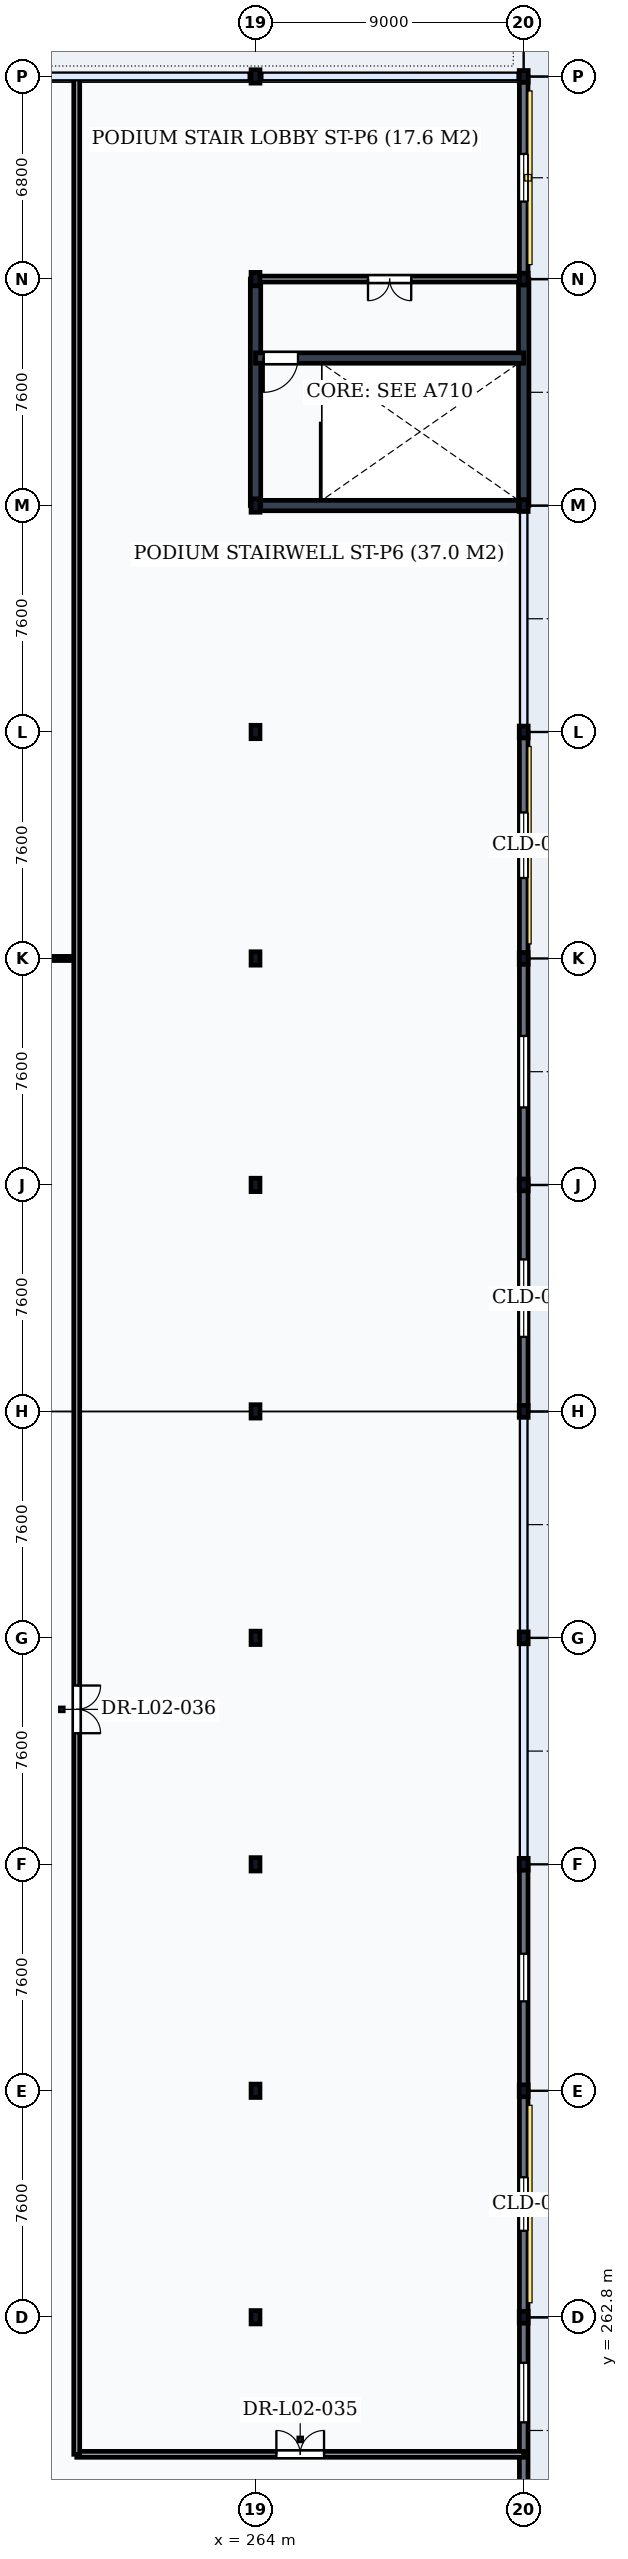
"""IFC4 building model, lengths in metres.
Left out: names, types, materials, properties, quantities, classifications, styles, units other than length and angle.
Written with IfcOpenShell. Run it as: python <this file> out.ifc"""

import sys

from ifc_helpers import new_model, si_unit, direction, frame, frame_2d, origin, origin_2d, place, context, subcontext, project, spatial, rectangle, i_section, extrude, element, fill, save


model = new_model("IFC4")
c1 = context("Model", 3, precision=1e-05, world=origin(), true_north=direction((0.0, 1.0)))
c2 = subcontext(c1, "Body", "Model", "MODEL_VIEW")
j1 = project(units=[si_unit("LENGTHUNIT", "METRE"), si_unit("PLANEANGLEUNIT", "RADIAN")], contexts=[c1])
p1 = place(None, origin())
s1 = spatial("IfcSite", under=j1, at=p1, CompositionType="ELEMENT")
p2 = place(p1, origin())
s2 = spatial("IfcBuilding", under=s1, at=p2, CompositionType="ELEMENT")
p3 = place(p2, frame((0.0, 0.0, 5.4)))
s3 = spatial("IfcBuildingStorey", under=s2, at=p3, CompositionType="ELEMENT", Elevation=5.4)
for number, where, z_axis, x_axis in (
    (1, (264.0, 262.8, 0.0), (0.0, 0.0, 1.0), (1.0, 0.0, 0.0)),
    (2, (264.0, 270.4, 0.0), (0.0, 0.0, 1.0), (1.0, 0.0, 0.0)),
    (3, (264.0, 278.0, 0.0), (0.0, 0.0, 1.0), (1.0, 0.0, 0.0)),
    (4, (264.0, 285.6, 0.0), (0.0, 0.0, 1.0), (1.0, 0.0, 0.0)),
    (5, (264.0, 293.2, 0.0), (0.0, 0.0, 1.0), (1.0, 0.0, 0.0)),
    (6, (264.0, 300.8, 0.0), (0.0, 0.0, 1.0), (1.0, 0.0, 0.0)),
    (7, (264.0, 308.4, 0.0), (0.0, 0.0, 1.0), (1.0, 0.0, 0.0)),
    (8, (264.0, 316.0, 0.0), (0.0, 0.0, 1.0), (1.0, 0.0, 0.0)),
    (9, (264.0, 323.6, 0.0), (0.0, 0.0, 1.0), (1.0, 0.0, 0.0)),
    (10, (264.0, 331.2, 0.0), (0.0, 0.0, 1.0), (1.0, 0.0, 0.0)),
    (11, (264.0, 338.0, 0.0), (0.0, 0.0, 1.0), (1.0, 0.0, 0.0)),
):
    element("IfcColumn", number, at=place(p3, frame(where, z_axis=z_axis, x_axis=x_axis)), inside=s3, PredefinedType="COLUMN", context=c2, shape_type="SweptSolid", body=[
        extrude(i_section(OverallWidth=0.3, OverallDepth=0.45, WebThickness=0.014, FlangeThickness=0.026, FilletRadius=0.027, at=origin_2d()), origin(), (0.0, 0.0, 1.0), 5.1),
    ])
for number, where, z_axis, x_axis in (
    (12, (273.0, 262.8, 0.0), (0.0, 0.0, 1.0), (1.0, 0.0, 0.0)),
    (13, (273.0, 270.4, 0.0), (0.0, 0.0, 1.0), (1.0, 0.0, 0.0)),
    (14, (273.0, 278.0, 0.0), (0.0, 0.0, 1.0), (1.0, 0.0, 0.0)),
    (15, (273.0, 285.6, 0.0), (0.0, 0.0, 1.0), (1.0, 0.0, 0.0)),
    (16, (273.0, 293.2, 0.0), (0.0, 0.0, 1.0), (1.0, 0.0, 0.0)),
    (17, (273.0, 300.8, 0.0), (0.0, 0.0, 1.0), (1.0, 0.0, 0.0)),
    (18, (273.0, 308.4, 0.0), (0.0, 0.0, 1.0), (1.0, 0.0, 0.0)),
    (19, (273.0, 316.0, 0.0), (0.0, 0.0, 1.0), (1.0, 0.0, 0.0)),
    (20, (273.0, 323.6, 0.0), (0.0, 0.0, 1.0), (1.0, 0.0, 0.0)),
    (21, (273.0, 331.2, 0.0), (0.0, 0.0, 1.0), (1.0, 0.0, 0.0)),
    (22, (273.0, 338.0, 0.0), (0.0, 0.0, 1.0), (1.0, 0.0, 0.0)),
):
    element("IfcColumn", number, at=place(p3, frame(where, z_axis=z_axis, x_axis=x_axis)), inside=s3, PredefinedType="COLUMN", context=c2, shape_type="SweptSolid", body=[
        extrude(i_section(OverallWidth=0.3, OverallDepth=0.4, WebThickness=0.013, FlangeThickness=0.024, FilletRadius=0.027, at=origin_2d()), origin(), (0.0, 0.0, 1.0), 5.1),
    ])
p4 = place(p3, frame((273.0, 255.206, 0.0), z_axis=(0.0, 0.0, 1.0), x_axis=(0.0, 1.0, 0.0)))
e23 = element("IfcWall", 23, at=p4, inside=s3, PredefinedType="SOLIDWALL", context=c2, shape_type="SweptSolid", body=[
    extrude(rectangle(XDim=7.588, YDim=0.29, at=frame_2d((3.794, 0.0))), origin(), (0.0, 0.0, 1.0), 4.588),
])
p5 = place(p4, frame((4.066, 0.0, 0.95)))
e24 = element("IfcOpeningElement", 24, at=p5, cuts=e23, PredefinedType="OPENING", context=c2, shape_type="SweptSolid", body=[
    extrude(rectangle(XDim=2.0, YDim=2.6, at=frame_2d((1.0, 1.3))), frame((0.0, 0.16, 0.0), z_axis=(0.0, -1.0, 0.0), x_axis=(1.0, 0.0, 0.0)), (0.0, 0.0, 1.0), 0.32),
])
p6 = place(p3, frame((273.0, 262.806, 0.0), z_axis=(0.0, 0.0, 1.0), x_axis=(0.0, 1.0, 0.0)))
e25 = element("IfcWall", 25, at=p6, inside=s3, PredefinedType="SOLIDWALL", context=c2, shape_type="SweptSolid", body=[
    extrude(rectangle(XDim=7.588, YDim=0.29, at=frame_2d((3.794, 0.0))), origin(), (0.0, 0.0, 1.0), 4.588),
])
p7 = place(p6, frame((2.894, 0.0, 0.95)))
e26 = element("IfcOpeningElement", 26, at=p7, cuts=e25, PredefinedType="OPENING", context=c2, shape_type="SweptSolid", body=[
    extrude(rectangle(XDim=1.8, YDim=2.6, at=frame_2d((0.9, 1.3))), frame((0.0, 0.16, 0.0), z_axis=(0.0, -1.0, 0.0), x_axis=(1.0, 0.0, 0.0)), (0.0, 0.0, 1.0), 0.32),
])
p8 = place(p3, frame((273.0, 270.406, 0.0), z_axis=(0.0, 0.0, 1.0), x_axis=(0.0, 1.0, 0.0)))
e27 = element("IfcWall", 27, at=p8, inside=s3, PredefinedType="SOLIDWALL", context=c2, shape_type="SweptSolid", body=[
    extrude(rectangle(XDim=7.588, YDim=0.29, at=frame_2d((3.794, 0.0))), origin(), (0.0, 0.0, 1.0), 4.588),
])
p9 = place(p8, frame((2.994, 0.0, 0.95)))
e28 = element("IfcOpeningElement", 28, at=p9, cuts=e27, PredefinedType="OPENING", context=c2, shape_type="SweptSolid", body=[
    extrude(rectangle(XDim=1.6, YDim=2.4, at=frame_2d((0.8, 1.2))), frame((0.0, 0.16, 0.0), z_axis=(0.0, -1.0, 0.0), x_axis=(1.0, 0.0, 0.0)), (0.0, 0.0, 1.0), 0.32),
])
p10 = place(p3, frame((273.0, 293.206, 0.0), z_axis=(0.0, 0.0, 1.0), x_axis=(0.0, 1.0, 0.0)))
e29 = element("IfcWall", 29, at=p10, inside=s3, PredefinedType="SOLIDWALL", context=c2, shape_type="SweptSolid", body=[
    extrude(rectangle(XDim=7.588, YDim=0.29, at=frame_2d((3.794, 0.0))), origin(), (0.0, 0.0, 1.0), 4.588),
])
p11 = place(p10, frame((2.494, 0.0, 0.95)))
e30 = element("IfcOpeningElement", 30, at=p11, cuts=e29, PredefinedType="OPENING", context=c2, shape_type="SweptSolid", body=[
    extrude(rectangle(XDim=2.6, YDim=3.0, at=frame_2d((1.3, 1.5))), frame((0.0, 0.16, 0.0), z_axis=(0.0, -1.0, 0.0), x_axis=(1.0, 0.0, 0.0)), (0.0, 0.0, 1.0), 0.32),
])
p12 = place(p3, frame((273.0, 300.806, 0.0), z_axis=(0.0, 0.0, 1.0), x_axis=(0.0, 1.0, 0.0)))
e31 = element("IfcWall", 31, at=p12, inside=s3, PredefinedType="SOLIDWALL", context=c2, shape_type="SweptSolid", body=[
    extrude(rectangle(XDim=7.588, YDim=0.29, at=frame_2d((3.794, 0.0))), origin(), (0.0, 0.0, 1.0), 4.588),
])
p13 = place(p12, frame((2.594, 0.0, 0.95)))
e32 = element("IfcOpeningElement", 32, at=p13, cuts=e31, PredefinedType="OPENING", context=c2, shape_type="SweptSolid", body=[
    extrude(rectangle(XDim=2.4, YDim=2.8, at=frame_2d((1.2, 1.4))), frame((0.0, 0.16, 0.0), z_axis=(0.0, -1.0, 0.0), x_axis=(1.0, 0.0, 0.0)), (0.0, 0.0, 1.0), 0.32),
])
p14 = place(p3, frame((273.0, 308.406, 0.0), z_axis=(0.0, 0.0, 1.0), x_axis=(0.0, 1.0, 0.0)))
e33 = element("IfcWall", 33, at=p14, inside=s3, PredefinedType="SOLIDWALL", context=c2, shape_type="SweptSolid", body=[
    extrude(rectangle(XDim=7.588, YDim=0.29, at=frame_2d((3.794, 0.0))), origin(), (0.0, 0.0, 1.0), 4.588),
])
p15 = place(p14, frame((2.694, 0.0, 0.95)))
e34 = element("IfcOpeningElement", 34, at=p15, cuts=e33, PredefinedType="OPENING", context=c2, shape_type="SweptSolid", body=[
    extrude(rectangle(XDim=2.2, YDim=2.8, at=frame_2d((1.1, 1.4))), frame((0.0, 0.16, 0.0), z_axis=(0.0, -1.0, 0.0), x_axis=(1.0, 0.0, 0.0)), (0.0, 0.0, 1.0), 0.32),
])
p16 = place(p3, frame((273.0, 331.206, 0.0), z_axis=(0.0, 0.0, 1.0), x_axis=(0.0, 1.0, 0.0)))
e35 = element("IfcWall", 35, at=p16, inside=s3, PredefinedType="SOLIDWALL", context=c2, shape_type="SweptSolid", body=[
    extrude(rectangle(XDim=6.788, YDim=0.29, at=frame_2d((3.394, 0.0))), origin(), (0.0, 0.0, 1.0), 4.618),
])
p17 = place(p16, frame((2.594, 0.0, 0.95)))
e36 = element("IfcOpeningElement", 36, at=p17, cuts=e35, PredefinedType="OPENING", context=c2, shape_type="SweptSolid", body=[
    extrude(rectangle(XDim=1.6, YDim=2.4, at=frame_2d((0.8, 1.2))), frame((0.0, 0.16, 0.0), z_axis=(0.0, -1.0, 0.0), x_axis=(1.0, 0.0, 0.0)), (0.0, 0.0, 1.0), 0.32),
])
p18 = place(p3, frame((255.1, 337.9, 5.1), z_axis=(0.0, 0.0, 1.0), x_axis=(1.0, 0.0, 0.0)))
e37 = element("IfcWall", 37, at=p18, inside=s3, PredefinedType="PARAPET", context=c2, shape_type="SweptSolid", body=[
    extrude(rectangle(XDim=17.8, YDim=0.18, at=frame_2d((8.9, 0.0))), origin(), (0.0, 0.0, 1.0), 1.2),
])
p19 = place(p3, frame((272.9, 323.8, 5.1), z_axis=(0.0, 0.0, 1.0), x_axis=(0.0, 1.0, 0.0)))
e38 = element("IfcWall", 38, at=p19, inside=s3, PredefinedType="PARAPET", context=c2, shape_type="SweptSolid", body=[
    extrude(rectangle(XDim=14.0, YDim=0.18, at=frame_2d((7.0, 0.0))), origin(), (0.0, 0.0, 1.0), 1.2),
])
p20 = place(p3, frame((264.0, 323.6, 0.0), z_axis=(0.0, 0.0, 1.0), x_axis=(1.0, 0.0, 0.0)))
e39 = element("IfcWall", 39, at=p20, inside=s3, PredefinedType="SHEAR", context=c2, shape_type="SweptSolid", body=[
    extrude(rectangle(XDim=9.0, YDim=0.35, at=frame_2d((4.5, 0.0))), origin(), (0.0, 0.0, 1.0), 4.85),
])
for number, where, z_axis, x_axis in (
    (40, (264.0, 323.6, 0.0), (0.0, 0.0, 1.0), (0.0, 1.0, 0.0)),
    (41, (273.0, 323.6, 0.0), (0.0, 0.0, 1.0), (0.0, 1.0, 0.0)),
):
    element("IfcWall", number, at=place(p3, frame(where, z_axis=z_axis, x_axis=x_axis)), inside=s3, PredefinedType="SHEAR", context=c2, shape_type="SweptSolid", body=[
        extrude(rectangle(XDim=7.6, YDim=0.35, at=frame_2d((3.8, 0.0))), origin(), (0.0, 0.0, 1.0), 4.85),
    ])
p21 = place(p3, frame((264.0, 328.55, 0.0), z_axis=(0.0, 0.0, 1.0), x_axis=(1.0, 0.0, 0.0)))
e42 = element("IfcWall", 42, at=p21, inside=s3, PredefinedType="SHEAR", context=c2, shape_type="SweptSolid", body=[
    extrude(rectangle(XDim=9.0, YDim=0.35, at=frame_2d((4.5, 0.0))), origin(), (0.0, 0.0, 1.0), 4.85),
])
p22 = place(p21, frame((0.275, 0.0, 0.0)))
e43 = element("IfcOpeningElement", 43, at=p22, cuts=e42, PredefinedType="OPENING", context=c2, shape_type="SweptSolid", body=[
    extrude(rectangle(XDim=1.15, YDim=2.15, at=frame_2d((0.575, 1.075))), frame((0.0, 0.19, 0.0), z_axis=(0.0, -1.0, 0.0), x_axis=(1.0, 0.0, 0.0)), (0.0, 0.0, 1.0), 0.38),
])
p23 = place(p3, frame((264.0, 331.2, 0.0), z_axis=(0.0, 0.0, 1.0), x_axis=(1.0, 0.0, 0.0)))
e44 = element("IfcWall", 44, at=p23, inside=s3, PredefinedType="PARTITIONING", context=c2, shape_type="SweptSolid", body=[
    extrude(rectangle(XDim=9.0, YDim=0.2, at=frame_2d((4.5, 0.0))), origin(), (0.0, 0.0, 1.0), 4.298),
])
p24 = place(p23, frame((3.775, 0.0, 0.0)))
e45 = element("IfcOpeningElement", 45, at=p24, cuts=e44, PredefinedType="OPENING", context=c2, shape_type="SweptSolid", body=[
    extrude(rectangle(XDim=1.45, YDim=2.2, at=frame_2d((0.725, 1.1))), frame((0.0, 0.115, 0.0), z_axis=(0.0, -1.0, 0.0), x_axis=(1.0, 0.0, 0.0)), (0.0, 0.0, 1.0), 0.23),
])
p25 = place(p3, frame((255.0, 308.4, 0.0), z_axis=(0.0, 0.0, 1.0), x_axis=(1.0, 0.0, 0.0)))
e46 = element("IfcWall", 46, at=p25, inside=s3, PredefinedType="PARTITIONING", context=c2, shape_type="SweptSolid", body=[
    extrude(rectangle(XDim=3.0, YDim=0.14, at=frame_2d((1.5, 0.0))), origin(), (0.0, 0.0, 1.0), 4.308),
])
p26 = place(p25, frame((0.95, 0.0, 0.0)))
e47 = element("IfcOpeningElement", 47, at=p26, cuts=e46, PredefinedType="OPENING", context=c2, shape_type="SweptSolid", body=[
    extrude(rectangle(XDim=1.1, YDim=2.1, at=frame_2d((0.55, 1.05))), frame((0.0, 0.085, 0.0), z_axis=(0.0, -1.0, 0.0), x_axis=(1.0, 0.0, 0.0)), (0.0, 0.0, 1.0), 0.17),
])
p27 = place(p3, frame((258.0, 258.2, 0.0), z_axis=(0.0, 0.0, 1.0), x_axis=(1.0, 0.0, 0.0)))
e48 = element("IfcWall", 48, at=p27, inside=s3, PredefinedType="PARTITIONING", context=c2, shape_type="SweptSolid", body=[
    extrude(rectangle(XDim=15.0, YDim=0.2, at=frame_2d((7.5, 0.0))), origin(), (0.0, 0.0, 1.0), 4.86),
])
p28 = place(p27, frame((6.7, 0.0, 0.0)))
e49 = element("IfcOpeningElement", 49, at=p28, cuts=e48, PredefinedType="OPENING", context=c2, shape_type="SweptSolid", body=[
    extrude(rectangle(XDim=1.6, YDim=2.25, at=frame_2d((0.8, 1.125))), frame((0.0, 0.115, 0.0), z_axis=(0.0, -1.0, 0.0), x_axis=(1.0, 0.0, 0.0)), (0.0, 0.0, 1.0), 0.23),
])
p29 = place(p3, frame((258.0, 258.2, 0.0), z_axis=(0.0, 0.0, 1.0), x_axis=(0.0, 1.0, 0.0)))
e50 = element("IfcWall", 50, at=p29, inside=s3, PredefinedType="PARTITIONING", context=c2, shape_type="SweptSolid", body=[
    extrude(rectangle(XDim=79.8, YDim=0.2, at=frame_2d((39.9, 0.0))), origin(), (0.0, 0.0, 1.0), 4.85),
])
p30 = place(p29, frame((24.2, 0.0, 0.0)))
e51 = element("IfcOpeningElement", 51, at=p30, cuts=e50, PredefinedType="OPENING", context=c2, shape_type="SweptSolid", body=[
    extrude(rectangle(XDim=1.6, YDim=2.25, at=frame_2d((0.8, 1.125))), frame((0.0, 0.115, 0.0), z_axis=(0.0, -1.0, 0.0), x_axis=(1.0, 0.0, 0.0)), (0.0, 0.0, 1.0), 0.23),
])
p31 = place(p5, origin())
e52 = element("IfcWindow", 52, at=p31, inside=s3, PartitioningType="DOUBLE_PANEL_VERTICAL", PredefinedType="WINDOW", context=c2, shape_type="SweptSolid", body=[
    extrude(rectangle(XDim=2.0, YDim=2.6, at=frame_2d((1.0, 1.3))), frame((0.0, 0.03, 0.0), z_axis=(0.0, -1.0, 0.0), x_axis=(1.0, 0.0, 0.0)), (0.0, 0.0, 1.0), 0.06),
])
fill(e24, e52)
p32 = place(p7, origin())
e53 = element("IfcWindow", 53, at=p32, inside=s3, PartitioningType="DOUBLE_PANEL_VERTICAL", PredefinedType="WINDOW", context=c2, shape_type="SweptSolid", body=[
    extrude(rectangle(XDim=1.8, YDim=2.6, at=frame_2d((0.9, 1.3))), frame((0.0, 0.03, 0.0), z_axis=(0.0, -1.0, 0.0), x_axis=(1.0, 0.0, 0.0)), (0.0, 0.0, 1.0), 0.06),
])
fill(e26, e53)
p33 = place(p9, origin())
e54 = element("IfcWindow", 54, at=p33, inside=s3, PartitioningType="SINGLE_PANEL", PredefinedType="WINDOW", context=c2, shape_type="SweptSolid", body=[
    extrude(rectangle(XDim=1.6, YDim=2.4, at=frame_2d((0.8, 1.2))), frame((0.0, 0.03, 0.0), z_axis=(0.0, -1.0, 0.0), x_axis=(1.0, 0.0, 0.0)), (0.0, 0.0, 1.0), 0.06),
])
fill(e28, e54)
p34 = place(p11, origin())
e55 = element("IfcWindow", 55, at=p34, inside=s3, PartitioningType="DOUBLE_PANEL_VERTICAL", PredefinedType="WINDOW", context=c2, shape_type="SweptSolid", body=[
    extrude(rectangle(XDim=2.6, YDim=3.0, at=frame_2d((1.3, 1.5))), frame((0.0, 0.03, 0.0), z_axis=(0.0, -1.0, 0.0), x_axis=(1.0, 0.0, 0.0)), (0.0, 0.0, 1.0), 0.06),
])
fill(e30, e55)
p35 = place(p13, origin())
e56 = element("IfcWindow", 56, at=p35, inside=s3, PartitioningType="DOUBLE_PANEL_VERTICAL", PredefinedType="WINDOW", context=c2, shape_type="SweptSolid", body=[
    extrude(rectangle(XDim=2.4, YDim=2.8, at=frame_2d((1.2, 1.4))), frame((0.0, 0.03, 0.0), z_axis=(0.0, -1.0, 0.0), x_axis=(1.0, 0.0, 0.0)), (0.0, 0.0, 1.0), 0.06),
])
fill(e32, e56)
p36 = place(p15, origin())
e57 = element("IfcWindow", 57, at=p36, inside=s3, PartitioningType="DOUBLE_PANEL_VERTICAL", PredefinedType="WINDOW", context=c2, shape_type="SweptSolid", body=[
    extrude(rectangle(XDim=2.2, YDim=2.8, at=frame_2d((1.1, 1.4))), frame((0.0, 0.03, 0.0), z_axis=(0.0, -1.0, 0.0), x_axis=(1.0, 0.0, 0.0)), (0.0, 0.0, 1.0), 0.06),
])
fill(e34, e57)
p37 = place(p17, origin())
e58 = element("IfcWindow", 58, at=p37, inside=s3, PartitioningType="SINGLE_PANEL", PredefinedType="WINDOW", context=c2, shape_type="SweptSolid", body=[
    extrude(rectangle(XDim=1.6, YDim=2.4, at=frame_2d((0.8, 1.2))), frame((0.0, 0.03, 0.0), z_axis=(0.0, -1.0, 0.0), x_axis=(1.0, 0.0, 0.0)), (0.0, 0.0, 1.0), 0.06),
])
fill(e36, e58)
p38 = place(p22, frame((1.15, 0.0, 0.0), z_axis=(0.0, 0.0, 1.0), x_axis=(-1.0, 0.0, 0.0)))
e59 = element("IfcDoor", 59, at=p38, inside=s3, OperationType="SINGLE_SWING_RIGHT", PredefinedType="DOOR", context=c2, shape_type="SweptSolid", body=[
    extrude(rectangle(XDim=1.15, YDim=2.15, at=frame_2d((0.575, 1.075))), frame((0.0, 0.025, 0.0), z_axis=(0.0, -1.0, 0.0), x_axis=(1.0, 0.0, 0.0)), (0.0, 0.0, 1.0), 0.05),
])
fill(e43, e59)
p39 = place(p24, frame((1.45, 0.0, 0.0), z_axis=(0.0, 0.0, 1.0), x_axis=(-1.0, 0.0, 0.0)))
e60 = element("IfcDoor", 60, at=p39, inside=s3, OperationType="DOUBLE_DOOR_SINGLE_SWING", PredefinedType="DOOR", context=c2, shape_type="SweptSolid", body=[
    extrude(rectangle(XDim=1.45, YDim=2.2, at=frame_2d((0.725, 1.1))), frame((0.0, 0.025, 0.0), z_axis=(0.0, -1.0, 0.0), x_axis=(1.0, 0.0, 0.0)), (0.0, 0.0, 1.0), 0.05),
])
fill(e45, e60)
p40 = place(p28, origin())
e61 = element("IfcDoor", 61, at=p40, inside=s3, OperationType="DOUBLE_DOOR_SINGLE_SWING", PredefinedType="DOOR", context=c2, shape_type="SweptSolid", body=[
    extrude(rectangle(XDim=1.6, YDim=2.25, at=frame_2d((0.8, 1.125))), frame((0.0, 0.025, 0.0), z_axis=(0.0, -1.0, 0.0), x_axis=(1.0, 0.0, 0.0)), (0.0, 0.0, 1.0), 0.05),
])
fill(e49, e61)
p41 = place(p30, frame((1.6, 0.0, 0.0), z_axis=(0.0, 0.0, 1.0), x_axis=(-1.0, 0.0, 0.0)))
e62 = element("IfcDoor", 62, at=p41, inside=s3, OperationType="DOUBLE_DOOR_SINGLE_SWING", PredefinedType="DOOR", context=c2, shape_type="SweptSolid", body=[
    extrude(rectangle(XDim=1.6, YDim=2.25, at=frame_2d((0.8, 1.125))), frame((0.0, 0.025, 0.0), z_axis=(0.0, -1.0, 0.0), x_axis=(1.0, 0.0, 0.0)), (0.0, 0.0, 1.0), 0.05),
])
fill(e51, e62)
save(model, sys.argv[1])
